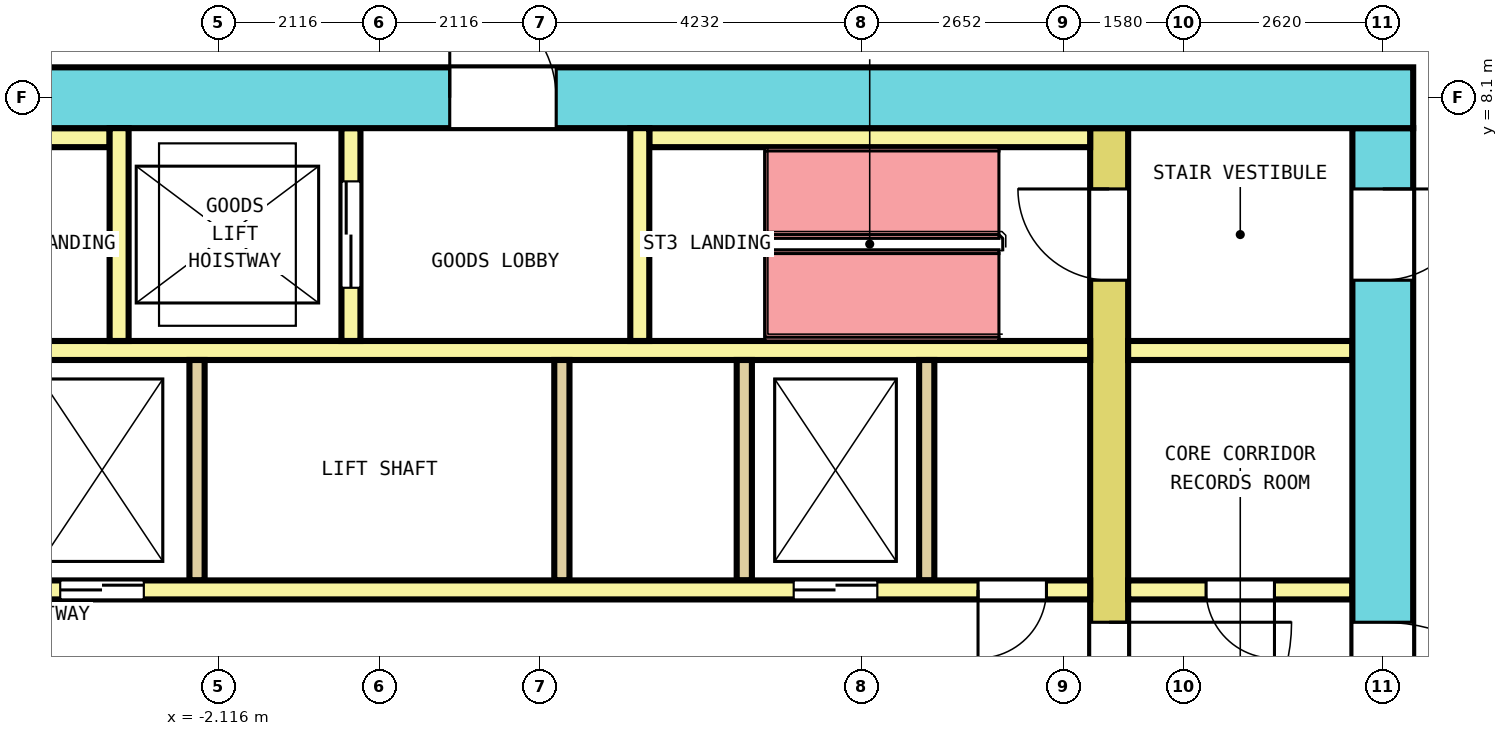
"""IFC4 building model, lengths in metres.
Left out: names, types, materials, properties, quantities, classifications, styles, units other than length and angle.
Written with IfcOpenShell. Run it as: python <this file> out.ifc"""

import sys

from ifc_helpers import new_model, si_unit, direction, frame, frame_2d, origin, place, context, subcontext, project, spatial, rectangle, extrude, element, fill, save


model = new_model("IFC4")
c1 = context("Model", 3, precision=1e-05, world=origin(), true_north=direction((0.0, 1.0)))
c2 = subcontext(c1, "Body", "Model", "MODEL_VIEW")
j1 = project(units=[si_unit("LENGTHUNIT", "METRE"), si_unit("PLANEANGLEUNIT", "RADIAN")], contexts=[c1])
p1 = place(None, origin())
s1 = spatial("IfcSite", under=j1, at=p1, CompositionType="ELEMENT")
p2 = place(p1, origin())
s2 = spatial("IfcBuilding", under=s1, at=p2, CompositionType="ELEMENT")
p3 = place(p2, frame((0.0, 0.0, 126.4)))
s3 = spatial("IfcBuildingStorey", under=s2, at=p3, CompositionType="ELEMENT", Elevation=126.4)
p4 = place(p3, frame((-13.6, 8.1, 0.0), z_axis=(0.0, 0.0, 1.0), x_axis=(1.0, 0.0, 0.0)))
e1 = element("IfcWall", 1, at=p4, inside=s3, PredefinedType="SHEAR", context=c2, shape_type="SweptSolid", body=[
    extrude(rectangle(XDim=27.2, YDim=0.8, at=frame_2d((13.6, 0.0))), origin(), (0.0, 0.0, 1.0), 4.1),
])
p5 = place(p4, frame((14.525, 0.0, 0.0)))
e2 = element("IfcOpeningElement", 2, at=p5, cuts=e1, PredefinedType="OPENING", context=c2, shape_type="SweptSolid", body=[
    extrude(rectangle(XDim=1.4, YDim=2.1, at=frame_2d((0.7, 1.05))), frame((0.0, 0.41, 0.0), z_axis=(0.0, -1.0, 0.0), x_axis=(1.0, 0.0, 0.0)), (0.0, 0.0, 1.0), 0.82),
])
p6 = place(p3, frame((13.2, -7.7, 0.0), z_axis=(0.0, 0.0, 1.0), x_axis=(0.0, 1.0, 0.0)))
e3 = element("IfcWall", 3, at=p6, inside=s3, PredefinedType="SHEAR", context=c2, shape_type="SweptSolid", body=[
    extrude(rectangle(XDim=15.4, YDim=0.8, at=frame_2d((7.7, 0.0))), origin(), (0.0, 0.0, 1.0), 4.1),
])
p7 = place(p6, frame((6.5, 0.0, 0.0)))
e4 = element("IfcOpeningElement", 4, at=p7, cuts=e3, PredefinedType="OPENING", context=c2, shape_type="SweptSolid", body=[
    extrude(rectangle(XDim=2.4, YDim=2.1, at=frame_2d((1.2, 1.05))), frame((0.0, 0.41, 0.0), z_axis=(0.0, -1.0, 0.0), x_axis=(1.0, 0.0, 0.0)), (0.0, 0.0, 1.0), 0.82),
])
p8 = place(p6, frame((13.4, 0.0, 0.0)))
e5 = element("IfcOpeningElement", 5, at=p8, cuts=e3, PredefinedType="OPENING", context=c2, shape_type="SweptSolid", body=[
    extrude(rectangle(XDim=1.2, YDim=2.1, at=frame_2d((0.6, 1.05))), frame((0.0, 0.41, 0.0), z_axis=(0.0, -1.0, 0.0), x_axis=(1.0, 0.0, 0.0)), (0.0, 0.0, 1.0), 0.82),
])
p9 = place(p6, frame((0.9, 0.0, 0.0)))
e6 = element("IfcOpeningElement", 6, at=p9, cuts=e3, PredefinedType="OPENING", context=c2, shape_type="SweptSolid", body=[
    extrude(rectangle(XDim=1.0, YDim=2.1, at=frame_2d((0.5, 1.05))), frame((0.0, 0.41, 0.0), z_axis=(0.0, -1.0, 0.0), x_axis=(1.0, 0.0, 0.0)), (0.0, 0.0, 1.0), 0.82),
])
p10 = place(p3, frame((9.6, -7.7, 0.0), z_axis=(0.0, 0.0, 1.0), x_axis=(0.0, 1.0, 0.0)))
e7 = element("IfcWall", 7, at=p10, inside=s3, PredefinedType="SHEAR", context=c2, shape_type="SweptSolid", body=[
    extrude(rectangle(XDim=15.4, YDim=0.5, at=frame_2d((7.7, 0.0))), origin(), (0.0, 0.0, 1.0), 4.1),
])
p11 = place(p10, frame((6.5, 0.0, 0.0)))
e8 = element("IfcOpeningElement", 8, at=p11, cuts=e7, PredefinedType="OPENING", context=c2, shape_type="SweptSolid", body=[
    extrude(rectangle(XDim=2.4, YDim=2.1, at=frame_2d((1.2, 1.05))), frame((0.0, 0.26, 0.0), z_axis=(0.0, -1.0, 0.0), x_axis=(1.0, 0.0, 0.0)), (0.0, 0.0, 1.0), 0.52),
])
p12 = place(p10, frame((13.4, 0.0, 0.0)))
e9 = element("IfcOpeningElement", 9, at=p12, cuts=e7, PredefinedType="OPENING", context=c2, shape_type="SweptSolid", body=[
    extrude(rectangle(XDim=1.2, YDim=2.1, at=frame_2d((0.6, 1.05))), frame((0.0, 0.26, 0.0), z_axis=(0.0, -1.0, 0.0), x_axis=(1.0, 0.0, 0.0)), (0.0, 0.0, 1.0), 0.52),
])
p13 = place(p10, frame((0.9, 0.0, 0.0)))
e10 = element("IfcOpeningElement", 10, at=p13, cuts=e7, PredefinedType="OPENING", context=c2, shape_type="SweptSolid", body=[
    extrude(rectangle(XDim=1.0, YDim=2.1, at=frame_2d((0.5, 1.05))), frame((0.0, 0.26, 0.0), z_axis=(0.0, -1.0, 0.0), x_axis=(1.0, 0.0, 0.0)), (0.0, 0.0, 1.0), 0.52),
])
p14 = place(p3, frame((-9.35, 1.625, 0.0), z_axis=(0.0, 0.0, 1.0), x_axis=(1.0, 0.0, 0.0)))
e11 = element("IfcWall", 11, at=p14, inside=s3, PredefinedType="SOLIDWALL", context=c2, shape_type="SweptSolid", body=[
    extrude(rectangle(XDim=18.7, YDim=0.25, at=frame_2d((9.35, 0.0))), origin(), (0.0, 0.0, 1.0), 4.1),
])
p15 = place(p14, frame((2.85, 0.0, 0.0)))
e12 = element("IfcOpeningElement", 12, at=p15, cuts=e11, PredefinedType="OPENING", context=c2, shape_type="SweptSolid", body=[
    extrude(rectangle(XDim=1.1, YDim=2.1, at=frame_2d((0.55, 1.05))), frame((0.0, 0.135, 0.0), z_axis=(0.0, -1.0, 0.0), x_axis=(1.0, 0.0, 0.0)), (0.0, 0.0, 1.0), 0.27),
])
p16 = place(p14, frame((5.15, 0.0, 0.0)))
e13 = element("IfcOpeningElement", 13, at=p16, cuts=e11, PredefinedType="OPENING", context=c2, shape_type="SweptSolid", body=[
    extrude(rectangle(XDim=1.1, YDim=2.1, at=frame_2d((0.55, 1.05))), frame((0.0, 0.135, 0.0), z_axis=(0.0, -1.0, 0.0), x_axis=(1.0, 0.0, 0.0)), (0.0, 0.0, 1.0), 0.27),
])
p17 = place(p14, frame((14.8, 0.0, 0.0)))
e14 = element("IfcOpeningElement", 14, at=p17, cuts=e11, PredefinedType="OPENING", context=c2, shape_type="SweptSolid", body=[
    extrude(rectangle(XDim=1.1, YDim=2.1, at=frame_2d((0.55, 1.05))), frame((0.0, 0.135, 0.0), z_axis=(0.0, -1.0, 0.0), x_axis=(1.0, 0.0, 0.0)), (0.0, 0.0, 1.0), 0.27),
])
p18 = place(p14, frame((0.575, 0.0, 0.0)))
e15 = element("IfcOpeningElement", 15, at=p18, cuts=e11, PredefinedType="OPENING", context=c2, shape_type="SweptSolid", body=[
    extrude(rectangle(XDim=0.9, YDim=2.1, at=frame_2d((0.45, 1.05))), frame((0.0, 0.135, 0.0), z_axis=(0.0, -1.0, 0.0), x_axis=(1.0, 0.0, 0.0)), (0.0, 0.0, 1.0), 0.27),
])
p19 = place(p14, frame((17.225, 0.0, 0.0)))
e16 = element("IfcOpeningElement", 16, at=p19, cuts=e11, PredefinedType="OPENING", context=c2, shape_type="SweptSolid", body=[
    extrude(rectangle(XDim=0.9, YDim=2.1, at=frame_2d((0.45, 1.05))), frame((0.0, 0.135, 0.0), z_axis=(0.0, -1.0, 0.0), x_axis=(1.0, 0.0, 0.0)), (0.0, 0.0, 1.0), 0.27),
])
p20 = place(p3, frame((9.85, 1.625, 0.0), z_axis=(0.0, 0.0, 1.0), x_axis=(1.0, 0.0, 0.0)))
e17 = element("IfcWall", 17, at=p20, inside=s3, PredefinedType="SOLIDWALL", context=c2, shape_type="SweptSolid", body=[
    extrude(rectangle(XDim=2.95, YDim=0.25, at=frame_2d((1.475, 0.0))), origin(), (0.0, 0.0, 1.0), 4.1),
])
p21 = place(p20, frame((1.025, 0.0, 0.0)))
e18 = element("IfcOpeningElement", 18, at=p21, cuts=e17, PredefinedType="OPENING", context=c2, shape_type="SweptSolid", body=[
    extrude(rectangle(XDim=0.9, YDim=2.1, at=frame_2d((0.45, 1.05))), frame((0.0, 0.135, 0.0), z_axis=(0.0, -1.0, 0.0), x_axis=(1.0, 0.0, 0.0)), (0.0, 0.0, 1.0), 0.27),
])
p22 = place(p3, frame((-9.35, 4.775, 0.0), z_axis=(0.0, 0.0, 1.0), x_axis=(1.0, 0.0, 0.0)))
e19 = element("IfcWall", 19, at=p22, inside=s3, PredefinedType="SOLIDWALL", context=c2, shape_type="SweptSolid", body=[
    extrude(rectangle(XDim=18.7, YDim=0.25, at=frame_2d((9.35, 0.0))), origin(), (0.0, 0.0, 1.0), 4.1),
])
p23 = place(p3, frame((9.85, 4.775, 0.0), z_axis=(0.0, 0.0, 1.0), x_axis=(1.0, 0.0, 0.0)))
e20 = element("IfcWall", 20, at=p23, inside=s3, PredefinedType="SOLIDWALL", context=c2, shape_type="SweptSolid", body=[
    extrude(rectangle(XDim=2.95, YDim=0.25, at=frame_2d((1.475, 0.0))), origin(), (0.0, 0.0, 1.0), 4.1),
])
for number, where, z_axis, x_axis in (
    (21, (-2.4, 1.75, 0.0), (0.0, 0.0, 1.0), (0.0, 1.0, 0.0)),
    (22, (2.4, 1.75, 0.0), (0.0, 0.0, 1.0), (0.0, 1.0, 0.0)),
    (23, (4.8, 1.75, 0.0), (0.0, 0.0, 1.0), (0.0, 1.0, 0.0)),
    (24, (7.2, 1.75, 0.0), (0.0, 0.0, 1.0), (0.0, 1.0, 0.0)),
):
    element("IfcWall", number, at=place(p3, frame(where, z_axis=z_axis, x_axis=x_axis)), inside=s3, PredefinedType="SOLIDWALL", context=c2, shape_type="SweptSolid", body=[
        extrude(rectangle(XDim=2.9, YDim=0.2, at=frame_2d((1.45, 0.0))), origin(), (0.0, 0.0, 1.0), 4.1),
    ])
for number, where, z_axis, x_axis in (
    (25, (-9.35, 7.575, 0.0), (0.0, 0.0, 1.0), (1.0, 0.0, 0.0)),
    (26, (3.55, 7.575, 0.0), (0.0, 0.0, 1.0), (1.0, 0.0, 0.0)),
):
    element("IfcWall", number, at=place(p3, frame(where, z_axis=z_axis, x_axis=x_axis)), inside=s3, PredefinedType="SOLIDWALL", context=c2, shape_type="SweptSolid", body=[
        extrude(rectangle(XDim=5.8, YDim=0.25, at=frame_2d((2.9, 0.0))), origin(), (0.0, 0.0, 1.0), 4.1),
    ])
p24 = place(p3, frame((-3.425, 4.9, 0.0), z_axis=(0.0, 0.0, 1.0), x_axis=(0.0, 1.0, 0.0)))
e27 = element("IfcWall", 27, at=p24, inside=s3, PredefinedType="SOLIDWALL", context=c2, shape_type="SweptSolid", body=[
    extrude(rectangle(XDim=2.8, YDim=0.25, at=frame_2d((1.4, 0.0))), origin(), (0.0, 0.0, 1.0), 4.1),
])
p25 = place(p3, frame((-0.375, 4.9, 0.0), z_axis=(0.0, 0.0, 1.0), x_axis=(0.0, 1.0, 0.0)))
e28 = element("IfcWall", 28, at=p25, inside=s3, PredefinedType="SOLIDWALL", context=c2, shape_type="SweptSolid", body=[
    extrude(rectangle(XDim=2.8, YDim=0.25, at=frame_2d((1.4, 0.0))), origin(), (0.0, 0.0, 1.0), 4.1),
])
p26 = place(p25, frame((0.7, 0.0, 0.0)))
e29 = element("IfcOpeningElement", 29, at=p26, cuts=e28, PredefinedType="OPENING", context=c2, shape_type="SweptSolid", body=[
    extrude(rectangle(XDim=1.4, YDim=2.1, at=frame_2d((0.7, 1.05))), frame((0.0, 0.135, 0.0), z_axis=(0.0, -1.0, 0.0), x_axis=(1.0, 0.0, 0.0)), (0.0, 0.0, 1.0), 0.27),
])
p27 = place(p3, frame((3.425, 4.9, 0.0), z_axis=(0.0, 0.0, 1.0), x_axis=(0.0, 1.0, 0.0)))
e30 = element("IfcWall", 30, at=p27, inside=s3, PredefinedType="SOLIDWALL", context=c2, shape_type="SweptSolid", body=[
    extrude(rectangle(XDim=2.8, YDim=0.25, at=frame_2d((1.4, 0.0))), origin(), (0.0, 0.0, 1.0), 4.1),
])
p28 = place(p16, origin())
e31 = element("IfcDoor", 31, at=p28, inside=s3, OperationType="DOUBLE_DOOR_SLIDING", PredefinedType="DOOR", context=c2, shape_type="SweptSolid", body=[
    extrude(rectangle(XDim=1.1, YDim=2.1, at=frame_2d((0.55, 1.05))), frame((0.0, 0.075, 0.0), z_axis=(0.0, -1.0, 0.0), x_axis=(1.0, 0.0, 0.0)), (0.0, 0.0, 1.0), 0.15),
])
fill(e13, e31)
p29 = place(p17, origin())
e32 = element("IfcDoor", 32, at=p29, inside=s3, OperationType="DOUBLE_DOOR_SLIDING", PredefinedType="DOOR", context=c2, shape_type="SweptSolid", body=[
    extrude(rectangle(XDim=1.1, YDim=2.1, at=frame_2d((0.55, 1.05))), frame((0.0, 0.075, 0.0), z_axis=(0.0, -1.0, 0.0), x_axis=(1.0, 0.0, 0.0)), (0.0, 0.0, 1.0), 0.15),
])
fill(e14, e32)
p30 = place(p26, origin())
e33 = element("IfcDoor", 33, at=p30, inside=s3, OperationType="DOUBLE_DOOR_SLIDING", PredefinedType="DOOR", context=c2, shape_type="SweptSolid", body=[
    extrude(rectangle(XDim=1.4, YDim=2.1, at=frame_2d((0.7, 1.05))), frame((0.0, 0.075, 0.0), z_axis=(0.0, -1.0, 0.0), x_axis=(1.0, 0.0, 0.0)), (0.0, 0.0, 1.0), 0.15),
])
fill(e29, e33)
p31 = place(p11, origin())
e34 = element("IfcDoor", 34, at=p31, inside=s3, OperationType="DOUBLE_DOOR_SINGLE_SWING", PredefinedType="DOOR", context=c2, shape_type="SweptSolid", body=[
    extrude(rectangle(XDim=2.4, YDim=2.1, at=frame_2d((1.2, 1.05))), frame((0.0, 0.2, 0.0), z_axis=(0.0, -1.0, 0.0), x_axis=(1.0, 0.0, 0.0)), (0.0, 0.0, 1.0), 0.4),
])
fill(e8, e34)
p32 = place(p7, origin())
e35 = element("IfcDoor", 35, at=p32, inside=s3, OperationType="DOUBLE_DOOR_SINGLE_SWING", PredefinedType="DOOR", context=c2, shape_type="SweptSolid", body=[
    extrude(rectangle(XDim=2.4, YDim=2.1, at=frame_2d((1.2, 1.05))), frame((0.0, 0.3, 0.0), z_axis=(0.0, -1.0, 0.0), x_axis=(1.0, 0.0, 0.0)), (0.0, 0.0, 1.0), 0.6),
])
fill(e4, e35)
p33 = place(p12, origin())
e36 = element("IfcDoor", 36, at=p33, inside=s3, OperationType="SINGLE_SWING_RIGHT", PredefinedType="DOOR", context=c2, shape_type="SweptSolid", body=[
    extrude(rectangle(XDim=1.2, YDim=2.1, at=frame_2d((0.6, 1.05))), frame((0.0, 0.2, 0.0), z_axis=(0.0, -1.0, 0.0), x_axis=(1.0, 0.0, 0.0)), (0.0, 0.0, 1.0), 0.4),
])
fill(e9, e36)
p34 = place(p8, origin())
e37 = element("IfcDoor", 37, at=p34, inside=s3, OperationType="SINGLE_SWING_LEFT", PredefinedType="DOOR", context=c2, shape_type="SweptSolid", body=[
    extrude(rectangle(XDim=1.2, YDim=2.1, at=frame_2d((0.6, 1.05))), frame((0.0, 0.3, 0.0), z_axis=(0.0, -1.0, 0.0), x_axis=(1.0, 0.0, 0.0)), (0.0, 0.0, 1.0), 0.6),
])
fill(e5, e37)
p35 = place(p5, origin())
e38 = element("IfcDoor", 38, at=p35, inside=s3, OperationType="DOUBLE_DOOR_SINGLE_SWING", PredefinedType="DOOR", context=c2, shape_type="SweptSolid", body=[
    extrude(rectangle(XDim=1.4, YDim=2.1, at=frame_2d((0.7, 1.05))), frame((0.0, 0.3, 0.0), z_axis=(0.0, -1.0, 0.0), x_axis=(1.0, 0.0, 0.0)), (0.0, 0.0, 1.0), 0.6),
])
fill(e2, e38)
p36 = place(p19, origin())
e39 = element("IfcDoor", 39, at=p36, inside=s3, OperationType="SINGLE_SWING_RIGHT", PredefinedType="DOOR", context=c2, shape_type="SweptSolid", body=[
    extrude(rectangle(XDim=0.9, YDim=2.1, at=frame_2d((0.45, 1.05))), frame((0.0, 0.075, 0.0), z_axis=(0.0, -1.0, 0.0), x_axis=(1.0, 0.0, 0.0)), (0.0, 0.0, 1.0), 0.15),
])
fill(e16, e39)
p37 = place(p21, origin())
e40 = element("IfcDoor", 40, at=p37, inside=s3, OperationType="SINGLE_SWING_LEFT", PredefinedType="DOOR", context=c2, shape_type="SweptSolid", body=[
    extrude(rectangle(XDim=0.9, YDim=2.1, at=frame_2d((0.45, 1.05))), frame((0.0, 0.075, 0.0), z_axis=(0.0, -1.0, 0.0), x_axis=(1.0, 0.0, 0.0)), (0.0, 0.0, 1.0), 0.15),
])
fill(e18, e40)
save(model, sys.argv[1])
